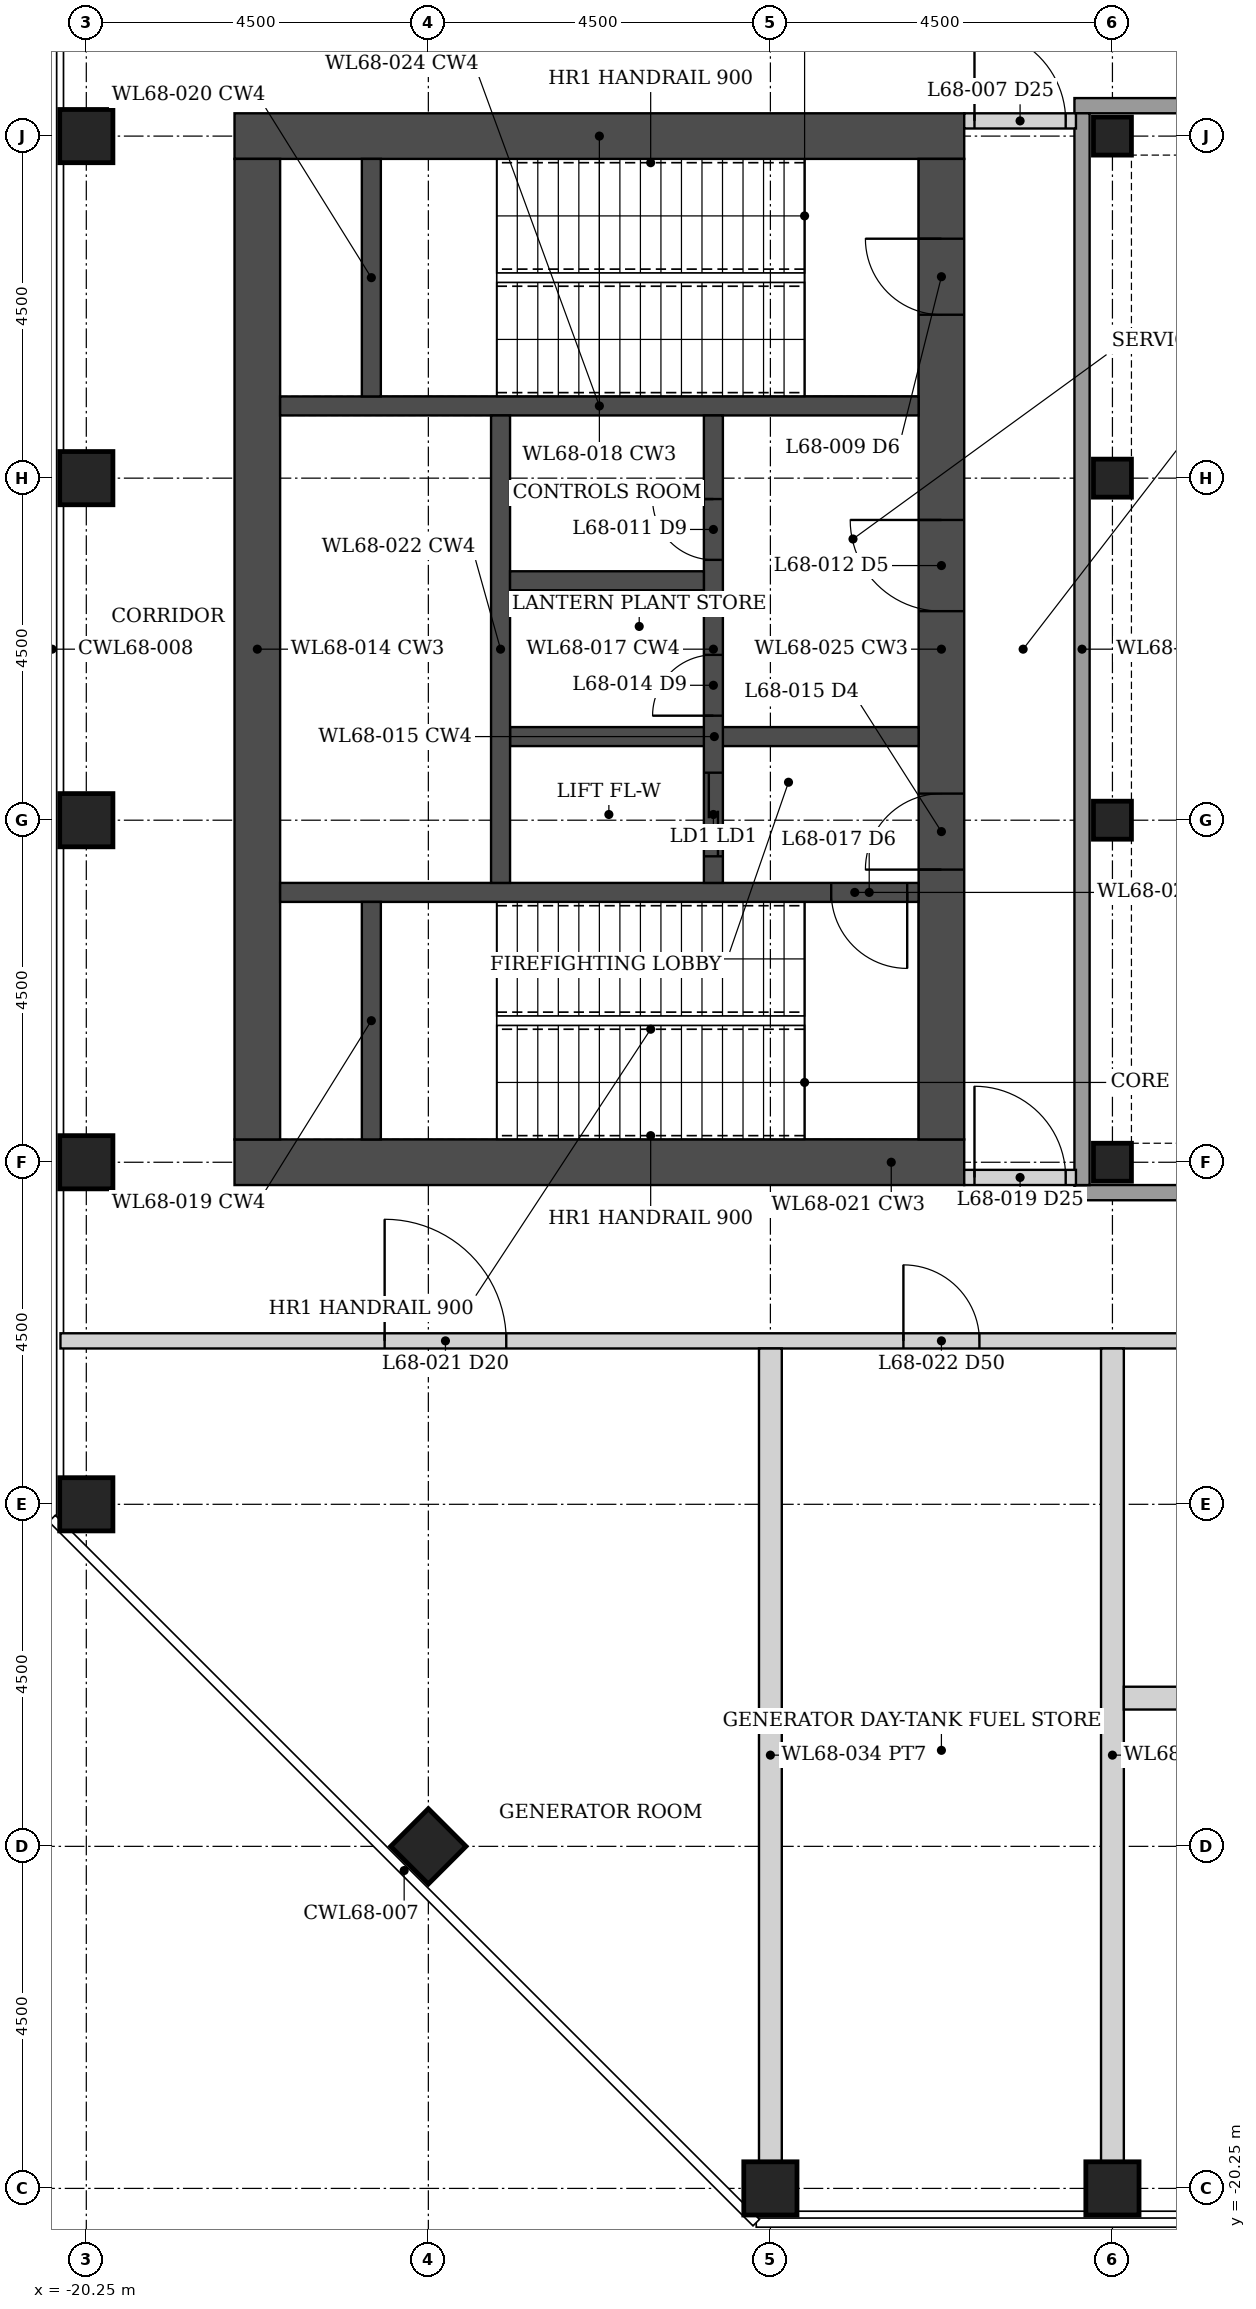
"""IFC4 building model, lengths in metres.
Left out: names, types, materials, properties, quantities, classifications, styles, units other than length and angle.
Written with IfcOpenShell. Run it as: python <this file> out.ifc"""

import sys

from ifc_helpers import new_model, si_unit, direction, frame, frame_2d, origin, origin_2d, place, context, subcontext, project, spatial, rectangle, hollow_rectangle, extrude, element, fill, save


model = new_model("IFC4")
c1 = context("Model", 3, precision=1e-05, world=origin(), true_north=direction((0.0, 1.0)))
c2 = subcontext(c1, "Body", "Model", "MODEL_VIEW")
j1 = project(units=[si_unit("LENGTHUNIT", "METRE"), si_unit("PLANEANGLEUNIT", "RADIAN")], contexts=[c1])
p1 = place(None, origin())
s1 = spatial("IfcSite", under=j1, at=p1, CompositionType="ELEMENT")
p2 = place(p1, origin())
s2 = spatial("IfcBuilding", under=s1, at=p2, CompositionType="ELEMENT")
p3 = place(p2, frame((0.0, 0.0, 262.05)))
s3 = spatial("IfcBuildingStorey", under=s2, at=p3, CompositionType="ELEMENT", Elevation=262.05)
for number, where, z_axis, x_axis in (
    (1, (-11.25, -20.25, 0.0), (0.0, 0.0, 1.0), (0.0, 1.0, 0.0)),
    (2, (-20.25, -11.25, 0.0), (0.0, 0.0, 1.0), (1.0, 0.0, 0.0)),
    (3, (-6.75, -20.25, 0.0), (0.0, 0.0, 1.0), (0.0, 1.0, 0.0)),
    (4, (-20.25, -6.75, 0.0), (0.0, 0.0, 1.0), (1.0, 0.0, 0.0)),
    (5, (-20.25, -2.25, 0.0), (0.0, 0.0, 1.0), (1.0, 0.0, 0.0)),
    (6, (-20.25, 2.25, 0.0), (0.0, 0.0, 1.0), (1.0, 0.0, 0.0)),
    (7, (-20.25, 6.75, 0.0), (0.0, 0.0, 1.0), (1.0, 0.0, 0.0)),
    (8, (-15.75, -15.75, 0.0), (0.0, 0.0, 1.0), (0.707, 0.707, 0.0)),
):
    element("IfcColumn", number, at=place(p3, frame(where, z_axis=z_axis, x_axis=x_axis)), inside=s3, PredefinedType="COLUMN", context=c2, shape_type="SweptSolid", body=[
        extrude(hollow_rectangle(XDim=0.7, YDim=0.7, WallThickness=0.035, at=origin_2d()), origin(), (0.0, 0.0, 1.0), 6.0),
    ])
for number, where, z_axis, x_axis in (
    (9, (-6.75, -6.75, 0.0), (0.0, 0.0, 1.0), (1.0, 0.0, 0.0)),
    (10, (-6.75, -2.25, 0.0), (0.0, 0.0, 1.0), (1.0, 0.0, 0.0)),
    (11, (-6.75, 2.25, 0.0), (0.0, 0.0, 1.0), (1.0, 0.0, 0.0)),
    (12, (-6.75, 6.75, 0.0), (0.0, 0.0, 1.0), (1.0, 0.0, 0.0)),
):
    element("IfcColumn", number, at=place(p3, frame(where, z_axis=z_axis, x_axis=x_axis)), inside=s3, PredefinedType="COLUMN", context=c2, shape_type="SweptSolid", body=[
        extrude(hollow_rectangle(XDim=0.5, YDim=0.5, WallThickness=0.025, at=origin_2d()), origin(), (0.0, 0.0, 1.0), 6.0),
    ])
for number, where, z_axis, x_axis in (
    (13, (-8.7, -6.75, 0.0), (0.0, 0.0, 1.0), (-1.0, 0.0, 0.0)),
    (14, (-8.7, 6.75, 0.0), (0.0, 0.0, 1.0), (-1.0, 0.0, 0.0)),
):
    element("IfcWall", number, at=place(p3, frame(where, z_axis=z_axis, x_axis=x_axis)), inside=s3, PredefinedType="SHEAR", context=c2, shape_type="SweptSolid", body=[
        extrude(rectangle(XDim=9.6, YDim=0.6, at=frame_2d((4.8, 0.0))), origin(), (0.0, 0.0, 1.0), 6.0),
    ])
p4 = place(p3, frame((-9.0, -6.45, 0.0), z_axis=(0.0, 0.0, 1.0), x_axis=(0.0, 1.0, 0.0)))
e15 = element("IfcWall", 15, at=p4, inside=s3, PredefinedType="SHEAR", context=c2, shape_type="SweptSolid", body=[
    extrude(rectangle(XDim=12.9, YDim=0.6, at=frame_2d((6.45, 0.0))), origin(), (0.0, 0.0, 1.0), 6.0),
])
p5 = place(p4, frame((3.55, 0.0, 0.0)))
e16 = element("IfcOpeningElement", 16, at=p5, cuts=e15, PredefinedType="OPENING", context=c2, shape_type="SweptSolid", body=[
    extrude(rectangle(XDim=1.0, YDim=2.1, at=frame_2d((0.5, 1.05))), frame((0.0, 0.31, 0.0), z_axis=(0.0, -1.0, 0.0), x_axis=(1.0, 0.0, 0.0)), (0.0, 0.0, 1.0), 0.62),
])
p6 = place(p4, frame((6.95, 0.0, 0.0)))
e17 = element("IfcOpeningElement", 17, at=p6, cuts=e15, PredefinedType="OPENING", context=c2, shape_type="SweptSolid", body=[
    extrude(rectangle(XDim=1.2, YDim=2.1, at=frame_2d((0.6, 1.05))), frame((0.0, 0.31, 0.0), z_axis=(0.0, -1.0, 0.0), x_axis=(1.0, 0.0, 0.0)), (0.0, 0.0, 1.0), 0.62),
])
p7 = place(p4, frame((10.85, 0.0, 0.0)))
e18 = element("IfcOpeningElement", 18, at=p7, cuts=e15, PredefinedType="OPENING", context=c2, shape_type="SweptSolid", body=[
    extrude(rectangle(XDim=1.0, YDim=2.1, at=frame_2d((0.5, 1.05))), frame((0.0, 0.31, 0.0), z_axis=(0.0, -1.0, 0.0), x_axis=(1.0, 0.0, 0.0)), (0.0, 0.0, 1.0), 0.62),
])
p8 = place(p3, frame((-18.0, -6.45, 0.0), z_axis=(0.0, 0.0, 1.0), x_axis=(0.0, 1.0, 0.0)))
e19 = element("IfcWall", 19, at=p8, inside=s3, PredefinedType="SHEAR", context=c2, shape_type="SweptSolid", body=[
    extrude(rectangle(XDim=12.9, YDim=0.6, at=frame_2d((6.45, 0.0))), origin(), (0.0, 0.0, 1.0), 6.0),
])
p9 = place(p3, frame((-9.3, -3.2, 0.0), z_axis=(0.0, 0.0, 1.0), x_axis=(-1.0, 0.0, 0.0)))
e20 = element("IfcWall", 20, at=p9, inside=s3, PredefinedType="SHEAR", context=c2, shape_type="SweptSolid", body=[
    extrude(rectangle(XDim=8.4, YDim=0.25, at=frame_2d((4.2, 0.0))), origin(), (0.0, 0.0, 1.0), 6.0),
])
p10 = place(p9, frame((0.15, 0.0, 0.0)))
e21 = element("IfcOpeningElement", 21, at=p10, cuts=e20, PredefinedType="OPENING", context=c2, shape_type="SweptSolid", body=[
    extrude(rectangle(XDim=1.0, YDim=2.1, at=frame_2d((0.5, 1.05))), frame((0.0, 0.135, 0.0), z_axis=(0.0, -1.0, 0.0), x_axis=(1.0, 0.0, 0.0)), (0.0, 0.0, 1.0), 0.27),
])
p11 = place(p3, frame((-9.3, 3.2, 0.0), z_axis=(0.0, 0.0, 1.0), x_axis=(-1.0, 0.0, 0.0)))
e22 = element("IfcWall", 22, at=p11, inside=s3, PredefinedType="SHEAR", context=c2, shape_type="SweptSolid", body=[
    extrude(rectangle(XDim=8.4, YDim=0.25, at=frame_2d((4.2, 0.0))), origin(), (0.0, 0.0, 1.0), 6.0),
])
for number, where, z_axis, x_axis in (
    (23, (-16.5, -6.45, 0.0), (0.0, 0.0, 1.0), (0.0, 1.0, 0.0)),
    (24, (-16.5, 3.325, 0.0), (0.0, 0.0, 1.0), (0.0, 1.0, 0.0)),
):
    element("IfcWall", number, at=place(p3, frame(where, z_axis=z_axis, x_axis=x_axis)), inside=s3, PredefinedType="SHEAR", context=c2, shape_type="SweptSolid", body=[
        extrude(rectangle(XDim=3.125, YDim=0.25, at=frame_2d((1.562, 0.0))), origin(), (0.0, 0.0, 1.0), 6.0),
    ])
p12 = place(p3, frame((-9.3, -1.15, 0.0), z_axis=(0.0, 0.0, 1.0), x_axis=(-1.0, 0.0, 0.0)))
e25 = element("IfcWall", 25, at=p12, inside=s3, PredefinedType="SHEAR", context=c2, shape_type="SweptSolid", body=[
    extrude(rectangle(XDim=5.375, YDim=0.25, at=frame_2d((2.688, 0.0))), origin(), (0.0, 0.0, 1.0), 6.0),
])
p13 = place(p3, frame((-12.0, -3.075, 0.0), z_axis=(0.0, 0.0, 1.0), x_axis=(0.0, 1.0, 0.0)))
e26 = element("IfcWall", 26, at=p13, inside=s3, PredefinedType="SHEAR", context=c2, shape_type="SweptSolid", body=[
    extrude(rectangle(XDim=6.15, YDim=0.25, at=frame_2d((3.075, 0.0))), origin(), (0.0, 0.0, 1.0), 6.0),
])
p14 = place(p13, frame((2.2, 0.0, 0.0)))
e27 = element("IfcOpeningElement", 27, at=p14, cuts=e26, PredefinedType="OPENING", context=c2, shape_type="SweptSolid", body=[
    extrude(rectangle(XDim=0.8, YDim=2.1, at=frame_2d((0.4, 1.05))), frame((0.0, 0.135, 0.0), z_axis=(0.0, -1.0, 0.0), x_axis=(1.0, 0.0, 0.0)), (0.0, 0.0, 1.0), 0.27),
])
p15 = place(p13, frame((4.25, 0.0, 0.0)))
e28 = element("IfcOpeningElement", 28, at=p15, cuts=e26, PredefinedType="OPENING", context=c2, shape_type="SweptSolid", body=[
    extrude(rectangle(XDim=0.8, YDim=2.1, at=frame_2d((0.4, 1.05))), frame((0.0, 0.135, 0.0), z_axis=(0.0, -1.0, 0.0), x_axis=(1.0, 0.0, 0.0)), (0.0, 0.0, 1.0), 0.27),
])
p16 = place(p13, frame((0.35, 0.0, 0.0)))
e29 = element("IfcOpeningElement", 29, at=p16, cuts=e26, PredefinedType="OPENING", context=c2, shape_type="SweptSolid", body=[
    extrude(rectangle(XDim=1.1, YDim=2.1, at=frame_2d((0.55, 1.05))), frame((0.0, 0.135, 0.0), z_axis=(0.0, -1.0, 0.0), x_axis=(1.0, 0.0, 0.0)), (0.0, 0.0, 1.0), 0.27),
])
p17 = place(p3, frame((-14.8, -3.075, 0.0), z_axis=(0.0, 0.0, 1.0), x_axis=(0.0, 1.0, 0.0)))
e30 = element("IfcWall", 30, at=p17, inside=s3, PredefinedType="SHEAR", context=c2, shape_type="SweptSolid", body=[
    extrude(rectangle(XDim=6.15, YDim=0.25, at=frame_2d((3.075, 0.0))), origin(), (0.0, 0.0, 1.0), 6.0),
])
p18 = place(p3, frame((-12.125, 0.9, 0.0), z_axis=(0.0, 0.0, 1.0), x_axis=(-1.0, 0.0, 0.0)))
e31 = element("IfcWall", 31, at=p18, inside=s3, PredefinedType="SHEAR", context=c2, shape_type="SweptSolid", body=[
    extrude(rectangle(XDim=2.55, YDim=0.25, at=frame_2d((1.275, 0.0))), origin(), (0.0, 0.0, 1.0), 6.0),
])
for number, where, z_axis, x_axis in (
    (32, (-7.25, 7.15, 0.0), (0.0, 0.0, 1.0), (1.0, 0.0, 0.0)),
    (33, (-7.25, -7.15, 0.0), (0.0, 0.0, 1.0), (1.0, 0.0, 0.0)),
):
    element("IfcWall", number, at=place(p3, frame(where, z_axis=z_axis, x_axis=x_axis)), inside=s3, PredefinedType="SOLIDWALL", context=c2, shape_type="SweptSolid", body=[
        extrude(rectangle(XDim=14.5, YDim=0.2, at=frame_2d((7.25, 0.0))), origin(), (0.0, 0.0, 1.0), 4.823),
    ])
p19 = place(p3, frame((-7.15, -7.05, 0.0), z_axis=(0.0, 0.0, 1.0), x_axis=(0.0, 1.0, 0.0)))
e34 = element("IfcWall", 34, at=p19, inside=s3, PredefinedType="SOLIDWALL", context=c2, shape_type="SweptSolid", body=[
    extrude(rectangle(XDim=14.1, YDim=0.2, at=frame_2d((7.05, 0.0))), origin(), (0.0, 0.0, 1.0), 4.823),
])
p20 = place(p3, frame((-8.7, 6.95, 0.0), z_axis=(0.0, 0.0, 1.0), x_axis=(1.0, 0.0, 0.0)))
e35 = element("IfcWall", 35, at=p20, inside=s3, PredefinedType="PARTITIONING", context=c2, shape_type="SweptSolid", body=[
    extrude(rectangle(XDim=1.47, YDim=0.2, at=frame_2d((0.735, 0.0))), origin(), (0.0, 0.0, 1.0), 4.823),
])
p21 = place(p20, frame((0.135, 0.0, 0.0)))
e36 = element("IfcOpeningElement", 36, at=p21, cuts=e35, PredefinedType="OPENING", context=c2, shape_type="SweptSolid", body=[
    extrude(rectangle(XDim=1.2, YDim=2.1, at=frame_2d((0.6, 1.05))), frame((0.0, 0.11, 0.0), z_axis=(0.0, -1.0, 0.0), x_axis=(1.0, 0.0, 0.0)), (0.0, 0.0, 1.0), 0.22),
])
p22 = place(p3, frame((-8.7, -6.95, 0.0), z_axis=(0.0, 0.0, 1.0), x_axis=(1.0, 0.0, 0.0)))
e37 = element("IfcWall", 37, at=p22, inside=s3, PredefinedType="PARTITIONING", context=c2, shape_type="SweptSolid", body=[
    extrude(rectangle(XDim=1.47, YDim=0.2, at=frame_2d((0.735, 0.0))), origin(), (0.0, 0.0, 1.0), 4.823),
])
p23 = place(p22, frame((0.135, 0.0, 0.0)))
e38 = element("IfcOpeningElement", 38, at=p23, cuts=e37, PredefinedType="OPENING", context=c2, shape_type="SweptSolid", body=[
    extrude(rectangle(XDim=1.2, YDim=2.1, at=frame_2d((0.6, 1.05))), frame((0.0, 0.11, 0.0), z_axis=(0.0, -1.0, 0.0), x_axis=(1.0, 0.0, 0.0)), (0.0, 0.0, 1.0), 0.22),
])
p24 = place(p3, frame((-20.59, -9.1, 0.0), z_axis=(0.0, 0.0, 1.0), x_axis=(1.0, 0.0, 0.0)))
e39 = element("IfcWall", 39, at=p24, inside=s3, PredefinedType="PARTITIONING", context=c2, shape_type="SweptSolid", body=[
    extrude(rectangle(XDim=41.18, YDim=0.2, at=frame_2d((20.59, 0.0))), origin(), (0.0, 0.0, 1.0), 4.823),
])
p25 = place(p24, frame((4.265, 0.0, 0.0)))
e40 = element("IfcOpeningElement", 40, at=p25, cuts=e39, PredefinedType="OPENING", context=c2, shape_type="SweptSolid", body=[
    extrude(rectangle(XDim=1.6, YDim=2.4, at=frame_2d((0.8, 1.2))), frame((0.0, 0.11, 0.0), z_axis=(0.0, -1.0, 0.0), x_axis=(1.0, 0.0, 0.0)), (0.0, 0.0, 1.0), 0.22),
])
p26 = place(p24, frame((11.09, 0.0, 0.0)))
e41 = element("IfcOpeningElement", 41, at=p26, cuts=e39, PredefinedType="OPENING", context=c2, shape_type="SweptSolid", body=[
    extrude(rectangle(XDim=1.0, YDim=2.1, at=frame_2d((0.5, 1.05))), frame((0.0, 0.11, 0.0), z_axis=(0.0, -1.0, 0.0), x_axis=(1.0, 0.0, 0.0)), (0.0, 0.0, 1.0), 0.22),
])
p27 = place(p24, frame((20.09, 0.0, 0.0)))
e42 = element("IfcOpeningElement", 42, at=p27, cuts=e39, PredefinedType="OPENING", context=c2, shape_type="SweptSolid", body=[
    extrude(rectangle(XDim=1.0, YDim=2.1, at=frame_2d((0.5, 1.05))), frame((0.0, 0.11, 0.0), z_axis=(0.0, -1.0, 0.0), x_axis=(1.0, 0.0, 0.0)), (0.0, 0.0, 1.0), 0.22),
])
p28 = place(p24, frame((29.09, 0.0, 0.0)))
e43 = element("IfcOpeningElement", 43, at=p28, cuts=e39, PredefinedType="OPENING", context=c2, shape_type="SweptSolid", body=[
    extrude(rectangle(XDim=1.0, YDim=2.1, at=frame_2d((0.5, 1.05))), frame((0.0, 0.11, 0.0), z_axis=(0.0, -1.0, 0.0), x_axis=(1.0, 0.0, 0.0)), (0.0, 0.0, 1.0), 0.22),
])
p29 = place(p24, frame((35.315, 0.0, 0.0)))
e44 = element("IfcOpeningElement", 44, at=p29, cuts=e39, PredefinedType="OPENING", context=c2, shape_type="SweptSolid", body=[
    extrude(rectangle(XDim=1.6, YDim=2.4, at=frame_2d((0.8, 1.2))), frame((0.0, 0.11, 0.0), z_axis=(0.0, -1.0, 0.0), x_axis=(1.0, 0.0, 0.0)), (0.0, 0.0, 1.0), 0.22),
])
for number, where, z_axis, x_axis in (
    (45, (-11.25, -19.9, 0.0), (0.0, 0.0, 1.0), (0.0, 1.0, 0.0)),
    (46, (-6.75, -19.9, 0.0), (0.0, 0.0, 1.0), (0.0, 1.0, 0.0)),
):
    element("IfcWall", number, at=place(p3, frame(where, z_axis=z_axis, x_axis=x_axis)), inside=s3, PredefinedType="PARTITIONING", context=c2, shape_type="SweptSolid", body=[
        extrude(rectangle(XDim=10.7, YDim=0.3, at=frame_2d((5.35, 0.0))), origin(), (0.0, 0.0, 1.0), 4.823),
    ])
p30 = place(p3, frame((-6.6, -13.8, 0.0), z_axis=(0.0, 0.0, 1.0), x_axis=(1.0, 0.0, 0.0)))
e47 = element("IfcWall", 47, at=p30, inside=s3, PredefinedType="PARTITIONING", context=c2, shape_type="SweptSolid", body=[
    extrude(rectangle(XDim=13.2, YDim=0.3, at=frame_2d((6.6, 0.0))), origin(), (0.0, 0.0, 1.0), 4.823),
])
p31 = place(p30, frame((5.8, 0.0, 0.0)))
e48 = element("IfcOpeningElement", 48, at=p31, cuts=e47, PredefinedType="OPENING", context=c2, shape_type="SweptSolid", body=[
    extrude(rectangle(XDim=1.6, YDim=2.4, at=frame_2d((0.8, 1.2))), frame((0.0, 0.16, 0.0), z_axis=(0.0, -1.0, 0.0), x_axis=(1.0, 0.0, 0.0)), (0.0, 0.0, 1.0), 0.32),
])
p32 = place(p21, origin())
e49 = element("IfcDoor", 49, at=p32, inside=s3, OperationType="DOUBLE_DOOR_DOUBLE_SWING", PredefinedType="DOOR", context=c2, shape_type="SweptSolid", body=[
    extrude(rectangle(XDim=1.2, YDim=2.1, at=frame_2d((0.6, 1.05))), frame((0.0, 0.025, 0.0), z_axis=(0.0, -1.0, 0.0), x_axis=(1.0, 0.0, 0.0)), (0.0, 0.0, 1.0), 0.05),
])
fill(e36, e49)
p33 = place(p23, origin())
e50 = element("IfcDoor", 50, at=p33, inside=s3, OperationType="DOUBLE_DOOR_DOUBLE_SWING", PredefinedType="DOOR", context=c2, shape_type="SweptSolid", body=[
    extrude(rectangle(XDim=1.2, YDim=2.1, at=frame_2d((0.6, 1.05))), frame((0.0, 0.025, 0.0), z_axis=(0.0, -1.0, 0.0), x_axis=(1.0, 0.0, 0.0)), (0.0, 0.0, 1.0), 0.05),
])
fill(e38, e50)
p34 = place(p25, origin())
e51 = element("IfcDoor", 51, at=p34, inside=s3, OperationType="SINGLE_SWING_LEFT", PredefinedType="DOOR", context=c2, shape_type="SweptSolid", body=[
    extrude(rectangle(XDim=1.6, YDim=2.4, at=frame_2d((0.8, 1.2))), frame((0.0, 0.025, 0.0), z_axis=(0.0, -1.0, 0.0), x_axis=(1.0, 0.0, 0.0)), (0.0, 0.0, 1.0), 0.05),
])
fill(e40, e51)
p35 = place(p26, origin())
e52 = element("IfcDoor", 52, at=p35, inside=s3, OperationType="SINGLE_SWING_LEFT", PredefinedType="DOOR", context=c2, shape_type="SweptSolid", body=[
    extrude(rectangle(XDim=1.0, YDim=2.1, at=frame_2d((0.5, 1.05))), frame((0.0, 0.025, 0.0), z_axis=(0.0, -1.0, 0.0), x_axis=(1.0, 0.0, 0.0)), (0.0, 0.0, 1.0), 0.05),
])
fill(e41, e52)
p36 = place(p5, origin())
e53 = element("IfcDoor", 53, at=p36, inside=s3, OperationType="SINGLE_SWING_LEFT", PredefinedType="DOOR", context=c2, shape_type="SweptSolid", body=[
    extrude(rectangle(XDim=1.0, YDim=2.1, at=frame_2d((0.5, 1.05))), frame((0.0, 0.025, 0.0), z_axis=(0.0, -1.0, 0.0), x_axis=(1.0, 0.0, 0.0)), (0.0, 0.0, 1.0), 0.05),
])
fill(e16, e53)
p37 = place(p10, origin())
e54 = element("IfcDoor", 54, at=p37, inside=s3, OperationType="SINGLE_SWING_LEFT", PredefinedType="DOOR", context=c2, shape_type="SweptSolid", body=[
    extrude(rectangle(XDim=1.0, YDim=2.1, at=frame_2d((0.5, 1.05))), frame((0.0, 0.025, 0.0), z_axis=(0.0, -1.0, 0.0), x_axis=(1.0, 0.0, 0.0)), (0.0, 0.0, 1.0), 0.05),
])
fill(e21, e54)
p38 = place(p6, origin())
e55 = element("IfcDoor", 55, at=p38, inside=s3, OperationType="SINGLE_SWING_RIGHT", PredefinedType="DOOR", context=c2, shape_type="SweptSolid", body=[
    extrude(rectangle(XDim=1.2, YDim=2.1, at=frame_2d((0.6, 1.05))), frame((0.0, 0.025, 0.0), z_axis=(0.0, -1.0, 0.0), x_axis=(1.0, 0.0, 0.0)), (0.0, 0.0, 1.0), 0.05),
])
fill(e17, e55)
p39 = place(p14, origin())
e56 = element("IfcDoor", 56, at=p39, inside=s3, OperationType="SINGLE_SWING_LEFT", PredefinedType="DOOR", context=c2, shape_type="SweptSolid", body=[
    extrude(rectangle(XDim=0.8, YDim=2.1, at=frame_2d((0.4, 1.05))), frame((0.0, 0.025, 0.0), z_axis=(0.0, -1.0, 0.0), x_axis=(1.0, 0.0, 0.0)), (0.0, 0.0, 1.0), 0.05),
])
fill(e27, e56)
p40 = place(p15, origin())
e57 = element("IfcDoor", 57, at=p40, inside=s3, OperationType="SINGLE_SWING_RIGHT", PredefinedType="DOOR", context=c2, shape_type="SweptSolid", body=[
    extrude(rectangle(XDim=0.8, YDim=2.1, at=frame_2d((0.4, 1.05))), frame((0.0, 0.025, 0.0), z_axis=(0.0, -1.0, 0.0), x_axis=(1.0, 0.0, 0.0)), (0.0, 0.0, 1.0), 0.05),
])
fill(e28, e57)
p41 = place(p7, origin())
e58 = element("IfcDoor", 58, at=p41, inside=s3, OperationType="SINGLE_SWING_RIGHT", PredefinedType="DOOR", context=c2, shape_type="SweptSolid", body=[
    extrude(rectangle(XDim=1.0, YDim=2.1, at=frame_2d((0.5, 1.05))), frame((0.0, 0.025, 0.0), z_axis=(0.0, -1.0, 0.0), x_axis=(1.0, 0.0, 0.0)), (0.0, 0.0, 1.0), 0.05),
])
fill(e18, e58)
p42 = place(p16, origin())
e59 = element("IfcDoor", 59, at=p42, inside=s3, OperationType="DOUBLE_DOOR_SLIDING", PredefinedType="DOOR", context=c2, shape_type="SweptSolid", body=[
    extrude(rectangle(XDim=1.1, YDim=2.1, at=frame_2d((0.55, 1.05))), frame((0.0, 0.025, 0.0), z_axis=(0.0, -1.0, 0.0), x_axis=(1.0, 0.0, 0.0)), (0.0, 0.0, 1.0), 0.05),
])
fill(e29, e59)
save(model, sys.argv[1])
